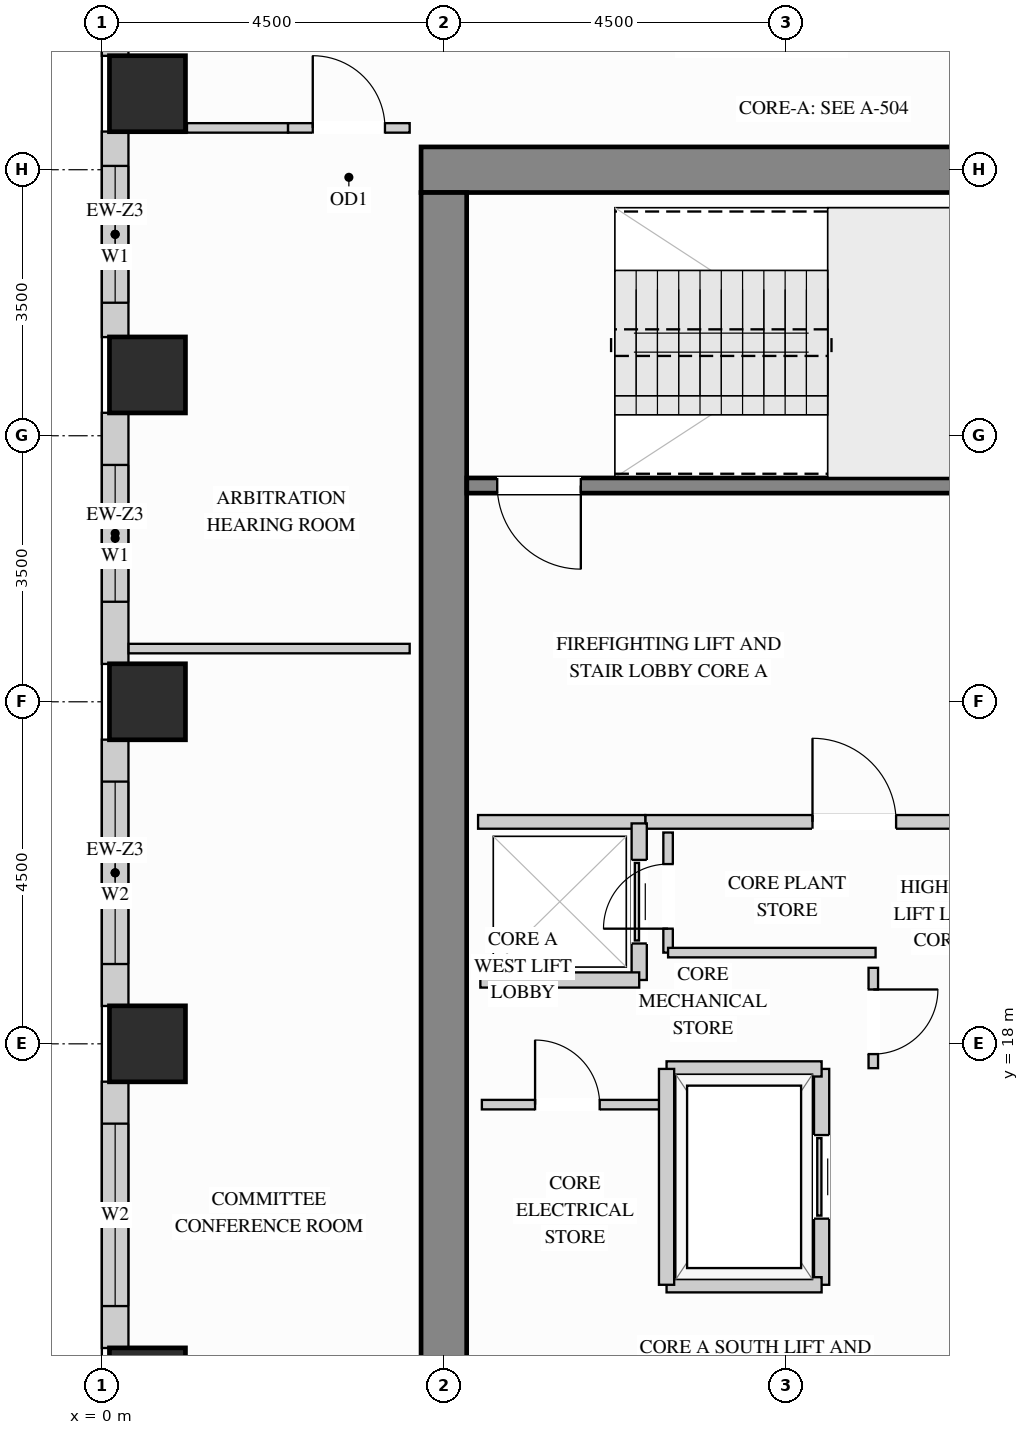
"""IFC4 building model, lengths in metres.
Left out: names, types, materials, properties, quantities, classifications, styles, units other than length and angle.
Written with IfcOpenShell. Run it as: python <this file> out.ifc"""

import sys

from ifc_helpers import new_model, si_unit, direction, frame, frame_2d, origin, origin_2d, place, context, subcontext, project, spatial, rectangle, extrude, source, transform, mapped, element, fill, save


model = new_model("IFC4")
c1 = context("Model", 3, precision=1e-05, world=origin(), true_north=direction((0.0, 1.0)))
c2 = subcontext(c1, "Body", "Model", "MODEL_VIEW")
j1 = project(units=[si_unit("LENGTHUNIT", "METRE"), si_unit("PLANEANGLEUNIT", "RADIAN")], contexts=[c1])
p1 = place(None, origin())
s1 = spatial("IfcSite", under=j1, at=p1, CompositionType="ELEMENT")
p2 = place(p1, origin())
s2 = spatial("IfcBuilding", under=s1, at=p2, CompositionType="ELEMENT")
p3 = place(p2, frame((0.0, 0.0, 153.9)))
s3 = spatial("IfcBuildingStorey", under=s2, at=p3, CompositionType="ELEMENT", Elevation=153.9)
m1 = source(origin(), c2, "Body", "SweptSolid", [
    extrude(rectangle(XDim=1.0, YDim=1.0, at=origin_2d()), origin(), (0.0, 0.0, 1.0), 3.4),
])
for number, where, z_axis, x_axis in (
    (1, (0.6, 13.5, 0.0), (0.0, 0.0, 1.0), (1.0, 0.0, 0.0)),
    (2, (0.6, 18.0, 0.0), (0.0, 0.0, 1.0), (1.0, 0.0, 0.0)),
    (3, (0.6, 22.5, 0.0), (0.0, 0.0, 1.0), (1.0, 0.0, 0.0)),
    (4, (0.6, 26.8, 0.0), (0.0, 0.0, 1.0), (1.0, 0.0, 0.0)),
    (5, (0.6, 30.5, 0.0), (0.0, 0.0, 1.0), (1.0, 0.0, 0.0)),
):
    element("IfcColumn", number, at=place(p3, frame(where, z_axis=z_axis, x_axis=x_axis)), inside=s3, PredefinedType="COLUMN", context=c2, shape_type="MappedRepresentation", body=[
        mapped(m1, transform((0.0, 0.0, 0.0), x_axis=(1.0, 0.0, 0.0), y_axis=(0.0, 1.0, 0.0), z_axis=(0.0, 0.0, 1.0))),
    ])
m2 = source(origin(), c2, "Body", "SweptSolid", [
    extrude(rectangle(XDim=10.6, YDim=0.6, at=frame_2d((5.3, 0.0))), origin(), (0.0, 0.0, 1.0), 3.4),
])
p4 = place(p3, frame((4.2, 29.5, 0.0), z_axis=(0.0, 0.0, 1.0), x_axis=(1.0, 0.0, 0.0)))
e6 = element("IfcWall", 6, at=p4, inside=s3, PredefinedType="SHEAR", context=c2, shape_type="MappedRepresentation", body=[
    mapped(m2, transform((0.0, 0.0, 0.0), x_axis=(1.0, 0.0, 0.0), y_axis=(0.0, 1.0, 0.0), z_axis=(0.0, 0.0, 1.0))),
])
m3 = source(origin(), c2, "Body", "SweptSolid", [
    extrude(rectangle(XDim=20.4, YDim=0.6, at=frame_2d((10.2, 0.0))), origin(), (0.0, 0.0, 1.0), 3.4),
])
p5 = place(p3, frame((4.5, 8.8, 0.0), z_axis=(0.0, 0.0, 1.0), x_axis=(0.0, 1.0, 0.0)))
e7 = element("IfcWall", 7, at=p5, inside=s3, PredefinedType="SHEAR", context=c2, shape_type="MappedRepresentation", body=[
    mapped(m3, transform((0.0, 0.0, 0.0), x_axis=(1.0, 0.0, 0.0), y_axis=(0.0, 1.0, 0.0), z_axis=(0.0, 0.0, 1.0))),
])
p6 = place(p3, frame((0.175, 34.502, 0.0), z_axis=(0.0, 0.0, 1.0), x_axis=(0.0, -1.0, 0.0)))
e8 = element("IfcWall", 8, at=p6, inside=s3, PredefinedType="SOLIDWALL", context=c2, shape_type="SweptSolid", body=[
    extrude(rectangle(XDim=3.504, YDim=0.35, at=frame_2d((1.752, 0.0))), origin(), (0.0, 0.0, 1.0), 2.612),
])
p7 = place(p6, frame((0.411, 0.0, 0.78)))
e9 = element("IfcOpeningElement", 9, at=p7, cuts=e8, PredefinedType="OPENING", context=c2, shape_type="SweptSolid", body=[
    extrude(rectangle(XDim=1.2, YDim=1.652, at=frame_2d((0.6, 0.826))), frame((0.0, 0.185, 0.0), z_axis=(0.0, -1.0, 0.0), x_axis=(1.0, 0.0, 0.0)), (0.0, 0.0, 1.0), 0.37),
])
p8 = place(p3, frame((0.175, 30.002, 0.0), z_axis=(0.0, 0.0, 1.0), x_axis=(0.0, -1.0, 0.0)))
e10 = element("IfcWall", 10, at=p8, inside=s3, PredefinedType="SOLIDWALL", context=c2, shape_type="SweptSolid", body=[
    extrude(rectangle(XDim=2.704, YDim=0.35, at=frame_2d((1.352, 0.0))), origin(), (0.0, 0.0, 1.0), 2.612),
])
p9 = place(p8, frame((0.452, 0.0, 0.78)))
e11 = element("IfcOpeningElement", 11, at=p9, cuts=e10, PredefinedType="OPENING", context=c2, shape_type="SweptSolid", body=[
    extrude(rectangle(XDim=1.8, YDim=1.652, at=frame_2d((0.9, 0.826))), frame((0.0, 0.185, 0.0), z_axis=(0.0, -1.0, 0.0), x_axis=(1.0, 0.0, 0.0)), (0.0, 0.0, 1.0), 0.37),
])
p10 = place(p3, frame((0.175, 26.302, 0.0), z_axis=(0.0, 0.0, 1.0), x_axis=(0.0, -1.0, 0.0)))
e12 = element("IfcWall", 12, at=p10, inside=s3, PredefinedType="SOLIDWALL", context=c2, shape_type="SweptSolid", body=[
    extrude(rectangle(XDim=3.304, YDim=0.35, at=frame_2d((1.652, 0.0))), origin(), (0.0, 0.0, 1.0), 2.612),
])
p11 = place(p10, frame((0.686, 0.0, 0.78)))
e13 = element("IfcOpeningElement", 13, at=p11, cuts=e12, PredefinedType="OPENING", context=c2, shape_type="SweptSolid", body=[
    extrude(rectangle(XDim=1.8, YDim=1.652, at=frame_2d((0.9, 0.826))), frame((0.0, 0.185, 0.0), z_axis=(0.0, -1.0, 0.0), x_axis=(1.0, 0.0, 0.0)), (0.0, 0.0, 1.0), 0.37),
])
p12 = place(p3, frame((0.175, 22.002, 0.0), z_axis=(0.0, 0.0, 1.0), x_axis=(0.0, -1.0, 0.0)))
e14 = element("IfcWall", 14, at=p12, inside=s3, PredefinedType="SOLIDWALL", context=c2, shape_type="SweptSolid", body=[
    extrude(rectangle(XDim=3.504, YDim=0.35, at=frame_2d((1.752, 0.0))), origin(), (0.0, 0.0, 1.0), 2.612),
])
p13 = place(p12, frame((0.552, 0.0, 0.78)))
e15 = element("IfcOpeningElement", 15, at=p13, cuts=e14, PredefinedType="OPENING", context=c2, shape_type="SweptSolid", body=[
    extrude(rectangle(XDim=2.4, YDim=1.652, at=frame_2d((1.2, 0.826))), frame((0.0, 0.185, 0.0), z_axis=(0.0, -1.0, 0.0), x_axis=(1.0, 0.0, 0.0)), (0.0, 0.0, 1.0), 0.37),
])
p14 = place(p3, frame((0.175, 17.502, 0.0), z_axis=(0.0, 0.0, 1.0), x_axis=(0.0, -1.0, 0.0)))
e16 = element("IfcWall", 16, at=p14, inside=s3, PredefinedType="SOLIDWALL", context=c2, shape_type="SweptSolid", body=[
    extrude(rectangle(XDim=3.504, YDim=0.35, at=frame_2d((1.752, 0.0))), origin(), (0.0, 0.0, 1.0), 2.612),
])
p15 = place(p14, frame((0.552, 0.0, 0.78)))
e17 = element("IfcOpeningElement", 17, at=p15, cuts=e16, PredefinedType="OPENING", context=c2, shape_type="SweptSolid", body=[
    extrude(rectangle(XDim=2.4, YDim=1.652, at=frame_2d((1.2, 0.826))), frame((0.0, 0.185, 0.0), z_axis=(0.0, -1.0, 0.0), x_axis=(1.0, 0.0, 0.0)), (0.0, 0.0, 1.0), 0.37),
])
p16 = place(p3, frame((7.15, 20.92, 0.0), z_axis=(0.0, 0.0, 1.0), x_axis=(1.0, 0.0, 0.0)))
e18 = element("IfcWall", 18, at=p16, inside=s3, PredefinedType="PARTITIONING", context=c2, shape_type="SweptSolid", body=[
    extrude(rectangle(XDim=4.68, YDim=0.18, at=frame_2d((2.34, 0.0))), origin(), (0.0, 0.0, 1.0), 3.385),
])
p17 = place(p16, frame((2.2, 0.0, 0.0)))
e19 = element("IfcOpeningElement", 19, at=p17, cuts=e18, PredefinedType="OPENING", context=c2, shape_type="SweptSolid", body=[
    extrude(rectangle(XDim=1.1, YDim=2.15, at=frame_2d((0.55, 1.075))), frame((0.0, 0.1, 0.0), z_axis=(0.0, -1.0, 0.0), x_axis=(1.0, 0.0, 0.0)), (0.0, 0.0, 1.0), 0.2),
])
m4 = source(origin(), c2, "Body", "SweptSolid", [
    extrude(rectangle(XDim=2.2, YDim=0.18, at=frame_2d((1.1, 0.0))), origin(), (0.0, 0.0, 1.0), 3.385),
])
p18 = place(p3, frame((4.95, 20.92, 0.0), z_axis=(0.0, 0.0, 1.0), x_axis=(1.0, 0.0, 0.0)))
e20 = element("IfcWall", 20, at=p18, inside=s3, PredefinedType="PARTITIONING", context=c2, shape_type="MappedRepresentation", body=[
    mapped(m4, transform((0.0, 0.0, 0.0), x_axis=(1.0, 0.0, 0.0), y_axis=(0.0, 1.0, 0.0), z_axis=(0.0, 0.0, 1.0))),
])
p19 = place(p3, frame((10.15, 17.68, 0.0), z_axis=(0.0, 0.0, 1.0), x_axis=(0.0, 1.0, 0.0)))
e21 = element("IfcWall", 21, at=p19, inside=s3, PredefinedType="PARTITIONING", context=c2, shape_type="SweptSolid", body=[
    extrude(rectangle(XDim=1.32, YDim=0.125, at=frame_2d((0.66, 0.0))), origin(), (0.0, 0.0, 1.0), 3.385),
])
p20 = place(p19, frame((0.185, 0.0, 0.0)))
e22 = element("IfcOpeningElement", 22, at=p20, cuts=e21, PredefinedType="OPENING", context=c2, shape_type="SweptSolid", body=[
    extrude(rectangle(XDim=0.85, YDim=2.1, at=frame_2d((0.425, 1.05))), frame((0.0, 0.073, 0.0), z_axis=(0.0, -1.0, 0.0), x_axis=(1.0, 0.0, 0.0)), (0.0, 0.0, 1.0), 0.145),
])
p21 = place(p3, frame((7.45, 19.2, 0.0), z_axis=(0.0, 0.0, 1.0), x_axis=(0.0, 1.0, 0.0)))
e23 = element("IfcWall", 23, at=p21, inside=s3, PredefinedType="PARTITIONING", context=c2, shape_type="SweptSolid", body=[
    extrude(rectangle(XDim=1.58, YDim=0.125, at=frame_2d((0.79, 0.0))), origin(), (0.0, 0.0, 1.0), 3.385),
])
p22 = place(p21, frame((0.315, 0.0, 0.0)))
e24 = element("IfcOpeningElement", 24, at=p22, cuts=e23, PredefinedType="OPENING", context=c2, shape_type="SweptSolid", body=[
    extrude(rectangle(XDim=0.85, YDim=2.1, at=frame_2d((0.425, 1.05))), frame((0.0, 0.073, 0.0), z_axis=(0.0, -1.0, 0.0), x_axis=(1.0, 0.0, 0.0)), (0.0, 0.0, 1.0), 0.145),
])
m5 = source(origin(), c2, "Body", "SweptSolid", [
    extrude(rectangle(XDim=2.73, YDim=0.125, at=frame_2d((1.365, 0.0))), origin(), (0.0, 0.0, 1.0), 3.385),
])
p23 = place(p3, frame((7.45, 19.2, 0.0), z_axis=(0.0, 0.0, 1.0), x_axis=(1.0, 0.0, 0.0)))
e25 = element("IfcWall", 25, at=p23, inside=s3, PredefinedType="PARTITIONING", context=c2, shape_type="MappedRepresentation", body=[
    mapped(m5, transform((0.0, 0.0, 0.0), x_axis=(1.0, 0.0, 0.0), y_axis=(0.0, 1.0, 0.0), z_axis=(0.0, 0.0, 1.0))),
])
p24 = place(p3, frame((5.0, 17.2, 0.0), z_axis=(0.0, 0.0, 1.0), x_axis=(1.0, 0.0, 0.0)))
e26 = element("IfcWall", 26, at=p24, inside=s3, PredefinedType="PARTITIONING", context=c2, shape_type="SweptSolid", body=[
    extrude(rectangle(XDim=2.4, YDim=0.125, at=frame_2d((1.2, 0.0))), origin(), (0.0, 0.0, 1.0), 3.385),
])
p25 = place(p24, frame((0.7, 0.0, 0.0)))
e27 = element("IfcOpeningElement", 27, at=p25, cuts=e26, PredefinedType="OPENING", context=c2, shape_type="SweptSolid", body=[
    extrude(rectangle(XDim=0.85, YDim=2.1, at=frame_2d((0.425, 1.05))), frame((0.0, 0.073, 0.0), z_axis=(0.0, -1.0, 0.0), x_axis=(1.0, 0.0, 0.0)), (0.0, 0.0, 1.0), 0.145),
])
m6 = source(origin(), c2, "Body", "SweptSolid", [
    extrude(rectangle(XDim=1.33, YDim=0.125, at=frame_2d((0.665, 0.0))), origin(), (0.0, 0.0, 1.0), 3.385),
])
p26 = place(p3, frame((1.12, 30.05, 0.0), z_axis=(0.0, 0.0, 1.0), x_axis=(1.0, 0.0, 0.0)))
e28 = element("IfcWall", 28, at=p26, inside=s3, PredefinedType="PARTITIONING", context=c2, shape_type="MappedRepresentation", body=[
    mapped(m6, transform((0.0, 0.0, 0.0), x_axis=(1.0, 0.0, 0.0), y_axis=(0.0, 1.0, 0.0), z_axis=(0.0, 0.0, 1.0))),
])
p27 = place(p3, frame((2.45, 30.05, 0.0), z_axis=(0.0, 0.0, 1.0), x_axis=(1.0, 0.0, 0.0)))
e29 = element("IfcWall", 29, at=p27, inside=s3, PredefinedType="PARTITIONING", context=c2, shape_type="SweptSolid", body=[
    extrude(rectangle(XDim=1.6, YDim=0.125, at=frame_2d((0.8, 0.0))), origin(), (0.0, 0.0, 1.0), 3.385),
])
p28 = place(p27, frame((0.325, 0.0, 0.0)))
e30 = element("IfcOpeningElement", 30, at=p28, cuts=e29, PredefinedType="OPENING", context=c2, shape_type="SweptSolid", body=[
    extrude(rectangle(XDim=0.95, YDim=2.15, at=frame_2d((0.475, 1.075))), frame((0.0, 0.073, 0.0), z_axis=(0.0, -1.0, 0.0), x_axis=(1.0, 0.0, 0.0)), (0.0, 0.0, 1.0), 0.145),
])
m7 = source(origin(), c2, "Body", "SweptSolid", [
    extrude(rectangle(XDim=3.698, YDim=0.125, at=frame_2d((1.849, 0.0))), origin(), (0.0, 0.0, 1.0), 3.385),
])
p29 = place(p3, frame((0.352, 23.2, 0.0), z_axis=(0.0, 0.0, 1.0), x_axis=(1.0, 0.0, 0.0)))
e31 = element("IfcWall", 31, at=p29, inside=s3, PredefinedType="PARTITIONING", context=c2, shape_type="MappedRepresentation", body=[
    mapped(m7, transform((0.0, 0.0, 0.0), x_axis=(1.0, 0.0, 0.0), y_axis=(0.0, 1.0, 0.0), z_axis=(0.0, 0.0, 1.0))),
])
p30 = place(p3, frame((7.07, 18.84, 0.0), z_axis=(0.0, 0.0, 1.0), x_axis=(0.0, 1.0, 0.0)))
e32 = element("IfcWall", 32, at=p30, inside=s3, PredefinedType="PARTITIONING", context=c2, shape_type="SweptSolid", body=[
    extrude(rectangle(XDim=2.06, YDim=0.2, at=frame_2d((1.03, 0.0))), origin(), (0.0, 0.0, 1.0), 3.385),
])
p31 = place(p30, frame((0.48, 0.0, 0.0)))
e33 = element("IfcOpeningElement", 33, at=p31, cuts=e32, PredefinedType="OPENING", context=c2, shape_type="SweptSolid", body=[
    extrude(rectangle(XDim=1.1, YDim=2.2, at=frame_2d((0.55, 1.1))), frame((0.0, 0.11, 0.0), z_axis=(0.0, -1.0, 0.0), x_axis=(1.0, 0.0, 0.0)), (0.0, 0.0, 1.0), 0.22),
])
m8 = source(origin(), c2, "Body", "SweptSolid", [
    extrude(rectangle(XDim=2.09, YDim=0.2, at=frame_2d((1.045, 0.0))), origin(), (0.0, 0.0, 1.0), 3.385),
])
p32 = place(p3, frame((4.98, 18.84, 0.0), z_axis=(0.0, 0.0, 1.0), x_axis=(1.0, 0.0, 0.0)))
e34 = element("IfcWall", 34, at=p32, inside=s3, PredefinedType="PARTITIONING", context=c2, shape_type="MappedRepresentation", body=[
    mapped(m8, transform((0.0, 0.0, 0.0), x_axis=(1.0, 0.0, 0.0), y_axis=(0.0, 1.0, 0.0), z_axis=(0.0, 0.0, 1.0))),
])
p33 = place(p3, frame((9.47, 14.83, 0.0), z_axis=(0.0, 0.0, 1.0), x_axis=(0.0, 1.0, 0.0)))
e35 = element("IfcWall", 35, at=p33, inside=s3, PredefinedType="PARTITIONING", context=c2, shape_type="SweptSolid", body=[
    extrude(rectangle(XDim=2.84, YDim=0.2, at=frame_2d((1.42, 0.0))), origin(), (0.0, 0.0, 1.0), 3.385),
])
p34 = place(p33, frame((0.87, 0.0, 0.0)))
e36 = element("IfcOpeningElement", 36, at=p34, cuts=e35, PredefinedType="OPENING", context=c2, shape_type="SweptSolid", body=[
    extrude(rectangle(XDim=1.1, YDim=2.2, at=frame_2d((0.55, 1.1))), frame((0.0, 0.11, 0.0), z_axis=(0.0, -1.0, 0.0), x_axis=(1.0, 0.0, 0.0)), (0.0, 0.0, 1.0), 0.22),
])
m9 = source(origin(), c2, "Body", "SweptSolid", [
    extrude(rectangle(XDim=2.04, YDim=0.2, at=frame_2d((1.02, 0.0))), origin(), (0.0, 0.0, 1.0), 3.385),
])
for number, where, z_axis, x_axis in (
    (37, (7.43, 17.67, 0.0), (0.0, 0.0, 1.0), (1.0, 0.0, 0.0)),
    (38, (7.43, 14.83, 0.0), (0.0, 0.0, 1.0), (1.0, 0.0, 0.0)),
):
    element("IfcWall", number, at=place(p3, frame(where, z_axis=z_axis, x_axis=x_axis)), inside=s3, PredefinedType="PARTITIONING", context=c2, shape_type="MappedRepresentation", body=[
        mapped(m9, transform((0.0, 0.0, 0.0), x_axis=(1.0, 0.0, 0.0), y_axis=(0.0, 1.0, 0.0), z_axis=(0.0, 0.0, 1.0))),
    ])
m10 = source(origin(), c2, "Body", "SweptSolid", [
    extrude(rectangle(XDim=2.84, YDim=0.2, at=frame_2d((1.42, 0.0))), origin(), (0.0, 0.0, 1.0), 3.385),
])
p35 = place(p3, frame((7.43, 14.83, 0.0), z_axis=(0.0, 0.0, 1.0), x_axis=(0.0, 1.0, 0.0)))
e39 = element("IfcWall", 39, at=p35, inside=s3, PredefinedType="PARTITIONING", context=c2, shape_type="MappedRepresentation", body=[
    mapped(m10, transform((0.0, 0.0, 0.0), x_axis=(1.0, 0.0, 0.0), y_axis=(0.0, 1.0, 0.0), z_axis=(0.0, 0.0, 1.0))),
])
p36 = place(p3, frame((4.802, 25.345, 0.0), z_axis=(0.0, 0.0, 1.0), x_axis=(1.0, 0.0, 0.0)))
e40 = element("IfcWall", 40, at=p36, inside=s3, PredefinedType="SHEAR", context=c2, shape_type="SweptSolid", body=[
    extrude(rectangle(XDim=7.603, YDim=0.2, at=frame_2d((3.802, 0.0))), origin(), (0.0, 0.0, 1.0), 3.4),
])
p37 = place(p36, frame((0.4, 0.0, 0.0)))
e41 = element("IfcOpeningElement", 41, at=p37, cuts=e40, PredefinedType="OPENING", context=c2, shape_type="SweptSolid", body=[
    extrude(rectangle(XDim=1.1, YDim=2.15, at=frame_2d((0.55, 1.075))), frame((0.0, 0.11, 0.0), z_axis=(0.0, -1.0, 0.0), x_axis=(1.0, 0.0, 0.0)), (0.0, 0.0, 1.0), 0.22),
])
m11 = source(origin(), c2, "Body", "SweptSolid", [
    extrude(rectangle(XDim=1.1, YDim=2.15, at=frame_2d((0.55, 1.075))), frame((0.0, 0.025, 0.0), z_axis=(0.0, -1.0, 0.0), x_axis=(1.0, 0.0, 0.0)), (0.0, 0.0, 1.0), 0.05),
])
p38 = place(p17, origin())
e42 = element("IfcDoor", 42, at=p38, inside=s3, OperationType="SINGLE_SWING_LEFT", PredefinedType="DOOR", context=c2, shape_type="MappedRepresentation", body=[
    mapped(m11, transform((0.0, 0.0, 0.0), x_axis=(1.0, 0.0, 0.0), y_axis=(0.0, 1.0, 0.0), z_axis=(0.0, 0.0, 1.0))),
])
fill(e19, e42)
m12 = source(origin(), c2, "Body", "SweptSolid", [
    extrude(rectangle(XDim=1.1, YDim=2.2, at=frame_2d((0.55, 1.1))), frame((0.0, 0.025, 0.0), z_axis=(0.0, -1.0, 0.0), x_axis=(1.0, 0.0, 0.0)), (0.0, 0.0, 1.0), 0.05),
])
p39 = place(p31, origin())
e43 = element("IfcDoor", 43, at=p39, inside=s3, OperationType="SLIDING_TO_LEFT", PredefinedType="DOOR", context=c2, shape_type="MappedRepresentation", body=[
    mapped(m12, transform((0.0, 0.0, 0.0), x_axis=(1.0, 0.0, 0.0), y_axis=(0.0, 1.0, 0.0), z_axis=(0.0, 0.0, 1.0))),
])
fill(e33, e43)
p40 = place(p34, origin())
e44 = element("IfcDoor", 44, at=p40, inside=s3, OperationType="SLIDING_TO_LEFT", PredefinedType="DOOR", context=c2, shape_type="MappedRepresentation", body=[
    mapped(m12, transform((0.0, 0.0, 0.0), x_axis=(1.0, 0.0, 0.0), y_axis=(0.0, 1.0, 0.0), z_axis=(0.0, 0.0, 1.0))),
])
fill(e36, e44)
m13 = source(origin(), c2, "Body", "SweptSolid", [
    extrude(rectangle(XDim=0.95, YDim=2.15, at=frame_2d((0.475, 1.075))), frame((0.0, 0.025, 0.0), z_axis=(0.0, -1.0, 0.0), x_axis=(1.0, 0.0, 0.0)), (0.0, 0.0, 1.0), 0.05),
])
p41 = place(p28, origin())
e45 = element("IfcDoor", 45, at=p41, inside=s3, OperationType="SINGLE_SWING_LEFT", PredefinedType="DOOR", context=c2, shape_type="MappedRepresentation", body=[
    mapped(m13, transform((0.0, 0.0, 0.0), x_axis=(1.0, 0.0, 0.0), y_axis=(0.0, 1.0, 0.0), z_axis=(0.0, 0.0, 1.0))),
])
fill(e30, e45)
m14 = source(origin(), c2, "Body", "SweptSolid", [
    extrude(rectangle(XDim=0.85, YDim=2.1, at=frame_2d((0.425, 1.05))), frame((0.0, 0.025, 0.0), z_axis=(0.0, -1.0, 0.0), x_axis=(1.0, 0.0, 0.0)), (0.0, 0.0, 1.0), 0.05),
])
p42 = place(p20, origin())
e46 = element("IfcDoor", 46, at=p42, inside=s3, OperationType="SINGLE_SWING_RIGHT", PredefinedType="DOOR", context=c2, shape_type="MappedRepresentation", body=[
    mapped(m14, transform((0.0, 0.0, 0.0), x_axis=(1.0, 0.0, 0.0), y_axis=(0.0, 1.0, 0.0), z_axis=(0.0, 0.0, 1.0))),
])
fill(e22, e46)
p43 = place(p25, origin())
e47 = element("IfcDoor", 47, at=p43, inside=s3, OperationType="SINGLE_SWING_LEFT", PredefinedType="DOOR", context=c2, shape_type="MappedRepresentation", body=[
    mapped(m14, transform((0.0, 0.0, 0.0), x_axis=(1.0, 0.0, 0.0), y_axis=(0.0, 1.0, 0.0), z_axis=(0.0, 0.0, 1.0))),
])
fill(e27, e47)
p44 = place(p22, origin())
e48 = element("IfcDoor", 48, at=p44, inside=s3, OperationType="SINGLE_SWING_LEFT", PredefinedType="DOOR", context=c2, shape_type="MappedRepresentation", body=[
    mapped(m14, transform((0.0, 0.0, 0.0), x_axis=(1.0, 0.0, 0.0), y_axis=(0.0, 1.0, 0.0), z_axis=(0.0, 0.0, 1.0))),
])
fill(e24, e48)
m15 = source(origin(), c2, "Body", "SweptSolid", [
    extrude(rectangle(XDim=1.1, YDim=2.15, at=frame_2d((0.55, 1.075))), frame((0.0, 0.025, 0.0), z_axis=(0.0, -1.0, 0.0), x_axis=(1.0, 0.0, 0.0)), (0.0, 0.0, 1.0), 0.05),
])
p45 = place(p37, origin())
e49 = element("IfcDoor", 49, at=p45, inside=s3, OperationType="SINGLE_SWING_RIGHT", PredefinedType="DOOR", context=c2, shape_type="MappedRepresentation", body=[
    mapped(m15, transform((0.0, 0.0, 0.0), x_axis=(1.0, 0.0, 0.0), y_axis=(0.0, 1.0, 0.0), z_axis=(0.0, 0.0, 1.0))),
])
fill(e41, e49)
m16 = source(origin(), c2, "Body", "SweptSolid", [
    extrude(rectangle(XDim=1.8, YDim=1.652, at=frame_2d((0.9, 0.826))), frame((0.0, 0.03, 0.0), z_axis=(0.0, -1.0, 0.0), x_axis=(1.0, 0.0, 0.0)), (0.0, 0.0, 1.0), 0.06),
])
p46 = place(p9, origin())
e50 = element("IfcWindow", 50, at=p46, inside=s3, PartitioningType="SINGLE_PANEL", PredefinedType="WINDOW", context=c2, shape_type="MappedRepresentation", body=[
    mapped(m16, transform((0.0, 0.0, 0.0), x_axis=(1.0, 0.0, 0.0), y_axis=(0.0, 1.0, 0.0), z_axis=(0.0, 0.0, 1.0))),
])
fill(e11, e50)
p47 = place(p11, origin())
e51 = element("IfcWindow", 51, at=p47, inside=s3, PartitioningType="SINGLE_PANEL", PredefinedType="WINDOW", context=c2, shape_type="MappedRepresentation", body=[
    mapped(m16, transform((0.0, 0.0, 0.0), x_axis=(1.0, 0.0, 0.0), y_axis=(0.0, 1.0, 0.0), z_axis=(0.0, 0.0, 1.0))),
])
fill(e13, e51)
m17 = source(origin(), c2, "Body", "SweptSolid", [
    extrude(rectangle(XDim=2.4, YDim=1.652, at=frame_2d((1.2, 0.826))), frame((0.0, 0.03, 0.0), z_axis=(0.0, -1.0, 0.0), x_axis=(1.0, 0.0, 0.0)), (0.0, 0.0, 1.0), 0.06),
])
p48 = place(p13, origin())
e52 = element("IfcWindow", 52, at=p48, inside=s3, PartitioningType="SINGLE_PANEL", PredefinedType="WINDOW", context=c2, shape_type="MappedRepresentation", body=[
    mapped(m17, transform((0.0, 0.0, 0.0), x_axis=(1.0, 0.0, 0.0), y_axis=(0.0, 1.0, 0.0), z_axis=(0.0, 0.0, 1.0))),
])
fill(e15, e52)
p49 = place(p15, origin())
e53 = element("IfcWindow", 53, at=p49, inside=s3, PartitioningType="SINGLE_PANEL", PredefinedType="WINDOW", context=c2, shape_type="MappedRepresentation", body=[
    mapped(m17, transform((0.0, 0.0, 0.0), x_axis=(1.0, 0.0, 0.0), y_axis=(0.0, 1.0, 0.0), z_axis=(0.0, 0.0, 1.0))),
])
fill(e17, e53)
save(model, sys.argv[1])
